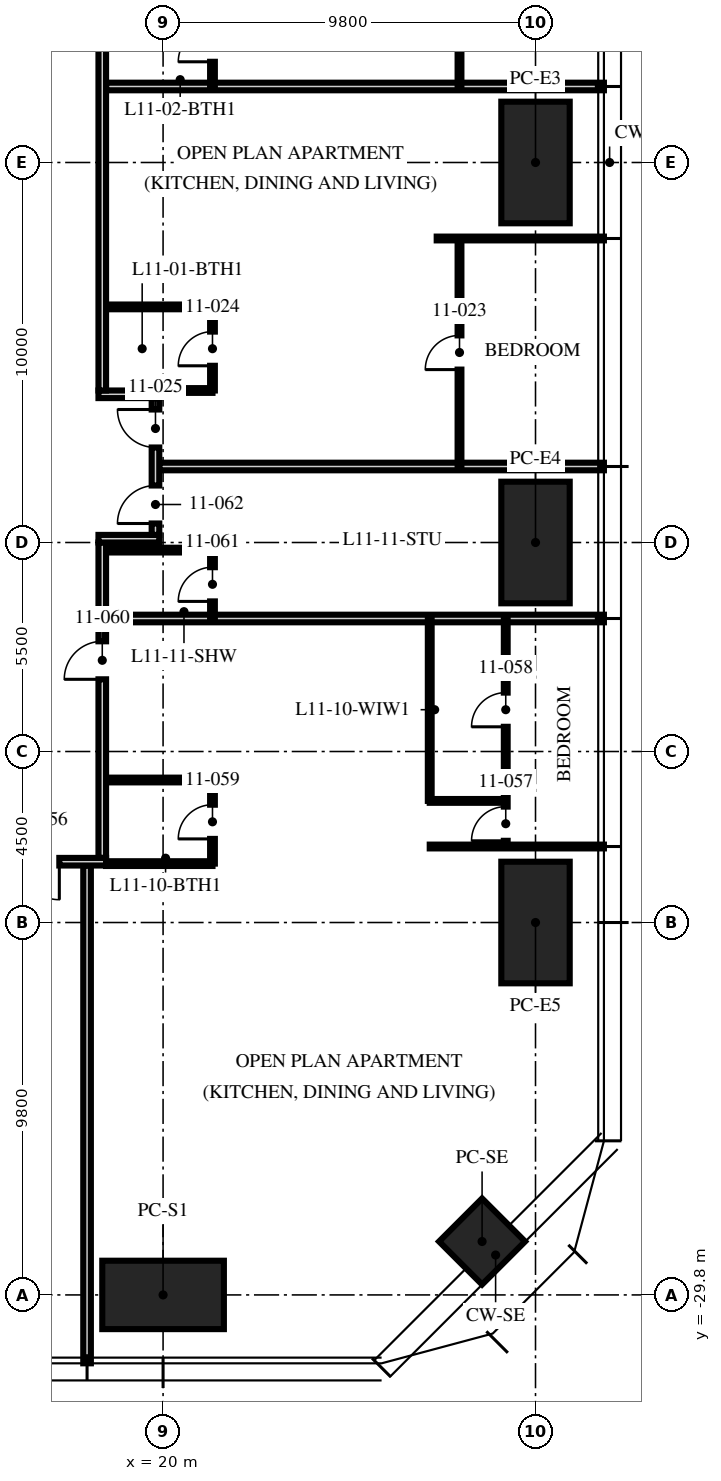
"""IFC4 building model, lengths in metres.
Left out: names, types, materials, properties, quantities, classifications, styles, units other than length and angle.
Written with IfcOpenShell. Run it as: python <this file> out.ifc"""

import sys

from ifc_helpers import new_model, si_unit, direction, frame, frame_2d, origin, origin_2d, place, context, subcontext, project, spatial, rectangle, hollow_rectangle, extrude, element, fill, save


model = new_model("IFC4")
c1 = context("Model", 3, precision=1e-05, world=origin(), true_north=direction((0.0, 1.0)))
c2 = subcontext(c1, "Body", "Model", "MODEL_VIEW")
j1 = project(units=[si_unit("LENGTHUNIT", "METRE"), si_unit("PLANEANGLEUNIT", "RADIAN")], contexts=[c1])
p1 = place(None, origin())
s1 = spatial("IfcSite", under=j1, at=p1, CompositionType="ELEMENT")
p2 = place(p1, origin())
s2 = spatial("IfcBuilding", under=s1, at=p2, CompositionType="ELEMENT")
p3 = place(p2, frame((0.0, 0.0, 47.25)))
s3 = spatial("IfcBuildingStorey", under=s2, at=p3, CompositionType="ELEMENT", Elevation=47.25)
for number, where, z_axis, x_axis in (
    (1, (29.8, 0.0, 0.0), (0.0, 0.0, 1.0), (0.0, 1.0, 0.0)),
    (2, (29.8, -10.0, 0.0), (0.0, 0.0, 1.0), (0.0, 1.0, 0.0)),
    (3, (29.8, -20.0, 0.0), (0.0, 0.0, 1.0), (0.0, 1.0, 0.0)),
    (4, (20.0, -29.8, 0.0), (0.0, 0.0, 1.0), (1.0, 0.0, 0.0)),
):
    element("IfcColumn", number, at=place(p3, frame(where, z_axis=z_axis, x_axis=x_axis)), inside=s3, PredefinedType="COLUMN", context=c2, shape_type="SweptSolid", body=[
        extrude(hollow_rectangle(XDim=3.2, YDim=1.8, WallThickness=0.2, at=origin_2d()), origin(), (0.0, 0.0, 1.0), 3.75),
    ])
p4 = place(p3, frame((28.394, -28.394, 0.0), z_axis=(0.0, 0.0, 1.0), x_axis=(0.707106781187, 0.707106781187, 0.0)))
e5 = element("IfcColumn", 5, at=p4, inside=s3, PredefinedType="COLUMN", context=c2, shape_type="SweptSolid", body=[
    extrude(hollow_rectangle(XDim=1.6, YDim=1.6, WallThickness=0.1, at=origin_2d()), origin(), (0.0, 0.0, 1.0), 3.75),
])
p5 = place(p3, frame((19.9, -8.0, 0.0), z_axis=(0.0, 0.0, 1.0), x_axis=(1.0, 0.0, 0.0)))
e6 = element("IfcWall", 6, at=p5, inside=s3, PredefinedType="PARTITIONING", context=c2, shape_type="SweptSolid", body=[
    extrude(rectangle(XDim=11.7, YDim=0.2, at=frame_2d((5.85, 0.0))), origin(), (0.0, 0.0, 1.0), 2.71),
])
p6 = place(p3, frame((27.2, -2.0, 0.0), z_axis=(0.0, 0.0, 1.0), x_axis=(1.0, 0.0, 0.0)))
e7 = element("IfcWall", 7, at=p6, inside=s3, PredefinedType="PARTITIONING", context=c2, shape_type="SweptSolid", body=[
    extrude(rectangle(XDim=4.4, YDim=0.1, at=frame_2d((2.2, 0.0))), origin(), (0.0, 0.0, 1.0), 2.71),
])
p7 = place(p3, frame((18.5, 2.0, 0.0), z_axis=(0.0, 0.0, 1.0), x_axis=(1.0, 0.0, 0.0)))
e8 = element("IfcWall", 8, at=p7, inside=s3, PredefinedType="PARTITIONING", context=c2, shape_type="SweptSolid", body=[
    extrude(rectangle(XDim=13.1, YDim=0.2, at=frame_2d((6.55, 0.0))), origin(), (0.0, 0.0, 1.0), 2.71),
])
p8 = place(p3, frame((18.0, -18.5, 0.0), z_axis=(0.0, 0.0, 1.0), x_axis=(0.0, -1.0, 0.0)))
e9 = element("IfcWall", 9, at=p8, inside=s3, PredefinedType="PARTITIONING", context=c2, shape_type="SweptSolid", body=[
    extrude(rectangle(XDim=13.1, YDim=0.2, at=frame_2d((6.55, 0.0))), origin(), (0.0, 0.0, 1.0), 2.3),
])
p9 = place(p3, frame((27.017, -18.0, 0.0), z_axis=(0.0, 0.0, 1.0), x_axis=(1.0, 0.0, 0.0)))
e10 = element("IfcWall", 10, at=p9, inside=s3, PredefinedType="PARTITIONING", context=c2, shape_type="SweptSolid", body=[
    extrude(rectangle(XDim=4.583, YDim=0.1, at=frame_2d((2.292, 0.0))), origin(), (0.0, 0.0, 1.0), 2.71),
])
p10 = place(p3, frame((18.5, -12.0, 0.0), z_axis=(0.0, 0.0, 1.0), x_axis=(1.0, 0.0, 0.0)))
e11 = element("IfcWall", 11, at=p10, inside=s3, PredefinedType="PARTITIONING", context=c2, shape_type="SweptSolid", body=[
    extrude(rectangle(XDim=13.1, YDim=0.2, at=frame_2d((6.55, 0.0))), origin(), (0.0, 0.0, 1.0), 2.71),
])
p11 = place(p3, frame((27.8, -8.0, 0.0), z_axis=(0.0, 0.0, 1.0), x_axis=(0.0, 1.0, 0.0)))
e12 = element("IfcWall", 12, at=p11, inside=s3, PredefinedType="PARTITIONING", context=c2, shape_type="SweptSolid", body=[
    extrude(rectangle(XDim=6.0, YDim=0.1, at=frame_2d((3.0, 0.0))), origin(), (0.0, 0.0, 1.0), 2.61),
])
p12 = place(p11, frame((2.55, 0.0, 0.0)))
e13 = element("IfcOpeningElement", 13, at=p12, cuts=e12, PredefinedType="OPENING", context=c2, shape_type="SweptSolid", body=[
    extrude(rectangle(XDim=0.9, YDim=2.1, at=frame_2d((0.45, 1.05))), frame((0.0, 0.06, 0.0), z_axis=(0.0, -1.0, 0.0), x_axis=(1.0, 0.0, 0.0)), (0.0, 0.0, 1.0), 0.12),
])
p13 = place(p3, frame((21.3, -6.0, 0.0), z_axis=(0.0, 0.0, 1.0), x_axis=(0.0, 1.0, 0.0)))
e14 = element("IfcWall", 14, at=p13, inside=s3, PredefinedType="PARTITIONING", context=c2, shape_type="SweptSolid", body=[
    extrude(rectangle(XDim=2.2, YDim=0.125, at=frame_2d((1.1, 0.0))), origin(), (0.0, 0.0, 1.0), 2.61),
])
p14 = place(p13, frame((0.65, 0.0, 0.0)))
e15 = element("IfcOpeningElement", 15, at=p14, cuts=e14, PredefinedType="OPENING", context=c2, shape_type="SweptSolid", body=[
    extrude(rectangle(XDim=0.9, YDim=2.1, at=frame_2d((0.45, 1.05))), frame((0.0, 0.073, 0.0), z_axis=(0.0, -1.0, 0.0), x_axis=(1.0, 0.0, 0.0)), (0.0, 0.0, 1.0), 0.145),
])
p15 = place(p3, frame((19.97, -6.0, 0.0), z_axis=(0.0, 0.0, 1.0), x_axis=(1.0, 0.0, 0.0)))
e16 = element("IfcWall", 16, at=p15, inside=s3, PredefinedType="PARTITIONING", context=c2, shape_type="SweptSolid", body=[
    extrude(rectangle(XDim=1.33, YDim=0.125, at=frame_2d((0.665, 0.0))), origin(), (0.0, 0.0, 1.0), 3.5),
])
p16 = place(p3, frame((18.5, -3.8, 0.0), z_axis=(0.0, 0.0, 1.0), x_axis=(1.0, 0.0, 0.0)))
e17 = element("IfcWall", 17, at=p16, inside=s3, PredefinedType="PARTITIONING", context=c2, shape_type="SweptSolid", body=[
    extrude(rectangle(XDim=2.8, YDim=0.125, at=frame_2d((1.4, 0.0))), origin(), (0.0, 0.0, 1.0), 3.5),
])
p17 = place(p3, frame((27.8, 2.0, 0.0), z_axis=(0.0, 0.0, 1.0), x_axis=(0.0, 1.0, 0.0)))
e18 = element("IfcWall", 18, at=p17, inside=s3, PredefinedType="PARTITIONING", context=c2, shape_type="SweptSolid", body=[
    extrude(rectangle(XDim=6.0, YDim=0.1, at=frame_2d((3.0, 0.0))), origin(), (0.0, 0.0, 1.0), 2.61),
])
p18 = place(p17, frame((2.55, 0.0, 0.0)))
e19 = element("IfcOpeningElement", 19, at=p18, cuts=e18, PredefinedType="OPENING", context=c2, shape_type="SweptSolid", body=[
    extrude(rectangle(XDim=0.9, YDim=2.1, at=frame_2d((0.45, 1.05))), frame((0.0, 0.06, 0.0), z_axis=(0.0, -1.0, 0.0), x_axis=(1.0, 0.0, 0.0)), (0.0, 0.0, 1.0), 0.12),
])
p19 = place(p3, frame((21.3, 2.0, 0.0), z_axis=(0.0, 0.0, 1.0), x_axis=(0.0, 1.0, 0.0)))
e20 = element("IfcWall", 20, at=p19, inside=s3, PredefinedType="PARTITIONING", context=c2, shape_type="SweptSolid", body=[
    extrude(rectangle(XDim=4.4, YDim=0.125, at=frame_2d((2.2, 0.0))), origin(), (0.0, 0.0, 1.0), 2.61),
])
p20 = place(p19, frame((0.65, 0.0, 0.0)))
e21 = element("IfcOpeningElement", 21, at=p20, cuts=e20, PredefinedType="OPENING", context=c2, shape_type="SweptSolid", body=[
    extrude(rectangle(XDim=0.9, YDim=2.1, at=frame_2d((0.45, 1.05))), frame((0.0, 0.073, 0.0), z_axis=(0.0, -1.0, 0.0), x_axis=(1.0, 0.0, 0.0)), (0.0, 0.0, 1.0), 0.145),
])
p21 = place(p19, frame((2.85, 0.0, 0.0)))
e22 = element("IfcOpeningElement", 22, at=p21, cuts=e20, PredefinedType="OPENING", context=c2, shape_type="SweptSolid", body=[
    extrude(rectangle(XDim=0.9, YDim=2.1, at=frame_2d((0.45, 1.05))), frame((0.0, 0.073, 0.0), z_axis=(0.0, -1.0, 0.0), x_axis=(1.0, 0.0, 0.0)), (0.0, 0.0, 1.0), 0.145),
])
p22 = place(p3, frame((29.017, -18.0, 0.0), z_axis=(0.0, 0.0, 1.0), x_axis=(0.0, 1.0, 0.0)))
e23 = element("IfcWall", 23, at=p22, inside=s3, PredefinedType="PARTITIONING", context=c2, shape_type="SweptSolid", body=[
    extrude(rectangle(XDim=6.0, YDim=0.1, at=frame_2d((3.0, 0.0))), origin(), (0.0, 0.0, 1.0), 2.61),
])
p23 = place(p22, frame((0.15, 0.0, 0.0)))
e24 = element("IfcOpeningElement", 24, at=p23, cuts=e23, PredefinedType="OPENING", context=c2, shape_type="SweptSolid", body=[
    extrude(rectangle(XDim=0.9, YDim=2.1, at=frame_2d((0.45, 1.05))), frame((0.0, 0.06, 0.0), z_axis=(0.0, -1.0, 0.0), x_axis=(1.0, 0.0, 0.0)), (0.0, 0.0, 1.0), 0.12),
])
p24 = place(p22, frame((3.15, 0.0, 0.0)))
e25 = element("IfcOpeningElement", 25, at=p24, cuts=e23, PredefinedType="OPENING", context=c2, shape_type="SweptSolid", body=[
    extrude(rectangle(XDim=0.9, YDim=2.1, at=frame_2d((0.45, 1.05))), frame((0.0, 0.06, 0.0), z_axis=(0.0, -1.0, 0.0), x_axis=(1.0, 0.0, 0.0)), (0.0, 0.0, 1.0), 0.12),
])
p25 = place(p3, frame((27.017, -16.8, 0.0), z_axis=(0.0, 0.0, 1.0), x_axis=(1.0, 0.0, 0.0)))
e26 = element("IfcWall", 26, at=p25, inside=s3, PredefinedType="PARTITIONING", context=c2, shape_type="SweptSolid", body=[
    extrude(rectangle(XDim=2.0, YDim=0.1, at=frame_2d((1.0, 0.0))), origin(), (0.0, 0.0, 1.0), 3.5),
])
p26 = place(p3, frame((27.017, -16.8, 0.0), z_axis=(0.0, 0.0, 1.0), x_axis=(0.0, 1.0, 0.0)))
e27 = element("IfcWall", 27, at=p26, inside=s3, PredefinedType="PARTITIONING", context=c2, shape_type="SweptSolid", body=[
    extrude(rectangle(XDim=4.8, YDim=0.1, at=frame_2d((2.4, 0.0))), origin(), (0.0, 0.0, 1.0), 2.61),
])
p27 = place(p3, frame((21.3, -18.45, 0.0), z_axis=(0.0, 0.0, 1.0), x_axis=(0.0, 1.0, 0.0)))
e28 = element("IfcWall", 28, at=p27, inside=s3, PredefinedType="PARTITIONING", context=c2, shape_type="SweptSolid", body=[
    extrude(rectangle(XDim=2.2, YDim=0.125, at=frame_2d((1.1, 0.0))), origin(), (0.0, 0.0, 1.0), 3.5),
])
p28 = place(p27, frame((0.65, 0.0, 0.0)))
e29 = element("IfcOpeningElement", 29, at=p28, cuts=e28, PredefinedType="OPENING", context=c2, shape_type="SweptSolid", body=[
    extrude(rectangle(XDim=0.9, YDim=2.1, at=frame_2d((0.45, 1.05))), frame((0.0, 0.073, 0.0), z_axis=(0.0, -1.0, 0.0), x_axis=(1.0, 0.0, 0.0)), (0.0, 0.0, 1.0), 0.145),
])
p29 = place(p3, frame((18.5, -18.45, 0.0), z_axis=(0.0, 0.0, 1.0), x_axis=(1.0, 0.0, 0.0)))
e30 = element("IfcWall", 30, at=p29, inside=s3, PredefinedType="PARTITIONING", context=c2, shape_type="SweptSolid", body=[
    extrude(rectangle(XDim=2.8, YDim=0.125, at=frame_2d((1.4, 0.0))), origin(), (0.0, 0.0, 1.0), 2.3),
])
p30 = place(p3, frame((18.5, -16.25, 0.0), z_axis=(0.0, 0.0, 1.0), x_axis=(1.0, 0.0, 0.0)))
e31 = element("IfcWall", 31, at=p30, inside=s3, PredefinedType="PARTITIONING", context=c2, shape_type="SweptSolid", body=[
    extrude(rectangle(XDim=2.8, YDim=0.125, at=frame_2d((1.4, 0.0))), origin(), (0.0, 0.0, 1.0), 3.5),
])
p31 = place(p3, frame((21.3, -12.0, 0.0), z_axis=(0.0, 0.0, 1.0), x_axis=(0.0, 1.0, 0.0)))
e32 = element("IfcWall", 32, at=p31, inside=s3, PredefinedType="PARTITIONING", context=c2, shape_type="SweptSolid", body=[
    extrude(rectangle(XDim=1.8, YDim=0.125, at=frame_2d((0.9, 0.0))), origin(), (0.0, 0.0, 1.0), 3.5),
])
p32 = place(p31, frame((0.45, 0.0, 0.0)))
e33 = element("IfcOpeningElement", 33, at=p32, cuts=e32, PredefinedType="OPENING", context=c2, shape_type="SweptSolid", body=[
    extrude(rectangle(XDim=0.9, YDim=2.1, at=frame_2d((0.45, 1.05))), frame((0.0, 0.073, 0.0), z_axis=(0.0, -1.0, 0.0), x_axis=(1.0, 0.0, 0.0)), (0.0, 0.0, 1.0), 0.145),
])
p33 = place(p3, frame((18.5, -10.2, 0.0), z_axis=(0.0, 0.0, 1.0), x_axis=(1.0, 0.0, 0.0)))
e34 = element("IfcWall", 34, at=p33, inside=s3, PredefinedType="PARTITIONING", context=c2, shape_type="SweptSolid", body=[
    extrude(rectangle(XDim=2.8, YDim=0.125, at=frame_2d((1.4, 0.0))), origin(), (0.0, 0.0, 1.0), 2.492),
])
p34 = place(p3, frame((18.4, -18.3, 0.0), z_axis=(0.0, 0.0, 1.0), x_axis=(0.0, 1.0, 0.0)))
e35 = element("IfcWall", 35, at=p34, inside=s3, PredefinedType="PARTITIONING", context=c2, shape_type="SweptSolid", body=[
    extrude(rectangle(XDim=8.3, YDim=0.2, at=frame_2d((4.15, 0.0))), origin(), (0.0, 0.0, 1.0), 2.3),
])
p35 = place(p34, frame((4.7, 0.0, 0.0)))
e36 = element("IfcOpeningElement", 36, at=p35, cuts=e35, PredefinedType="OPENING", context=c2, shape_type="SweptSolid", body=[
    extrude(rectangle(XDim=1.0, YDim=2.2, at=frame_2d((0.5, 1.1))), frame((0.0, 0.11, 0.0), z_axis=(0.0, -1.0, 0.0), x_axis=(1.0, 0.0, 0.0)), (0.0, 0.0, 1.0), 0.22),
])
p36 = place(p3, frame((18.3, -9.9, 0.0), z_axis=(0.0, 0.0, 1.0), x_axis=(1.0, 0.0, 0.0)))
e37 = element("IfcWall", 37, at=p36, inside=s3, PredefinedType="PARTITIONING", context=c2, shape_type="SweptSolid", body=[
    extrude(rectangle(XDim=1.6, YDim=0.2, at=frame_2d((0.8, 0.0))), origin(), (0.0, 0.0, 1.0), 2.492),
])
p37 = place(p3, frame((18.3, -6.1, 0.0), z_axis=(0.0, 0.0, 1.0), x_axis=(1.0, 0.0, 0.0)))
e38 = element("IfcWall", 38, at=p37, inside=s3, PredefinedType="PARTITIONING", context=c2, shape_type="SweptSolid", body=[
    extrude(rectangle(XDim=1.6, YDim=0.2, at=frame_2d((0.8, 0.0))), origin(), (0.0, 0.0, 1.0), 3.5),
])
p38 = place(p3, frame((19.8, -9.8, 0.0), z_axis=(0.0, 0.0, 1.0), x_axis=(0.0, 1.0, 0.0)))
e39 = element("IfcWall", 39, at=p38, inside=s3, PredefinedType="PARTITIONING", context=c2, shape_type="SweptSolid", body=[
    extrude(rectangle(XDim=3.6, YDim=0.2, at=frame_2d((1.8, 0.0))), origin(), (0.0, 0.0, 1.0), 3.5),
])
p39 = place(p38, frame((2.3, 0.0, 0.0)))
e40 = element("IfcOpeningElement", 40, at=p39, cuts=e39, PredefinedType="OPENING", context=c2, shape_type="SweptSolid", body=[
    extrude(rectangle(XDim=1.0, YDim=2.2, at=frame_2d((0.5, 1.1))), frame((0.0, 0.11, 0.0), z_axis=(0.0, -1.0, 0.0), x_axis=(1.0, 0.0, 0.0)), (0.0, 0.0, 1.0), 0.22),
])
p40 = place(p38, frame((0.3, 0.0, 0.0)))
e41 = element("IfcOpeningElement", 41, at=p40, cuts=e39, PredefinedType="OPENING", context=c2, shape_type="SweptSolid", body=[
    extrude(rectangle(XDim=1.0, YDim=2.2, at=frame_2d((0.5, 1.1))), frame((0.0, 0.11, 0.0), z_axis=(0.0, -1.0, 0.0), x_axis=(1.0, 0.0, 0.0)), (0.0, 0.0, 1.0), 0.22),
])
p41 = place(p3, frame((18.4, -6.0, 0.0), z_axis=(0.0, 0.0, 1.0), x_axis=(0.0, 1.0, 0.0)))
e42 = element("IfcWall", 42, at=p41, inside=s3, PredefinedType="PARTITIONING", context=c2, shape_type="SweptSolid", body=[
    extrude(rectangle(XDim=24.3, YDim=0.2, at=frame_2d((12.15, 0.0))), origin(), (0.0, 0.0, 1.0), 2.3),
])
p42 = place(p3, frame((18.5, -18.4, 0.0), z_axis=(0.0, 0.0, 1.0), x_axis=(-1.0, 0.0, 0.0)))
e43 = element("IfcWall", 43, at=p42, inside=s3, PredefinedType="PARTITIONING", context=c2, shape_type="SweptSolid", body=[
    extrude(rectangle(XDim=37.0, YDim=0.2, at=frame_2d((18.5, 0.0))), origin(), (0.0, 0.0, 1.0), 2.3),
])
p43 = place(p42, frame((1.23, 0.0, 0.0)))
e44 = element("IfcOpeningElement", 44, at=p43, cuts=e43, PredefinedType="OPENING", context=c2, shape_type="SweptSolid", body=[
    extrude(rectangle(XDim=1.0, YDim=2.2, at=frame_2d((0.5, 1.1))), frame((0.0, 0.11, 0.0), z_axis=(0.0, -1.0, 0.0), x_axis=(1.0, 0.0, 0.0)), (0.0, 0.0, 1.0), 0.22),
])
p44 = place(p12, origin())
e45 = element("IfcDoor", 45, at=p44, inside=s3, OperationType="SINGLE_SWING_LEFT", PredefinedType="DOOR", context=c2, shape_type="SweptSolid", body=[
    extrude(rectangle(XDim=0.9, YDim=2.1, at=frame_2d((0.45, 1.05))), frame((0.0, 0.025, 0.0), z_axis=(0.0, -1.0, 0.0), x_axis=(1.0, 0.0, 0.0)), (0.0, 0.0, 1.0), 0.05),
])
fill(e13, e45)
p45 = place(p14, origin())
e46 = element("IfcDoor", 46, at=p45, inside=s3, OperationType="SINGLE_SWING_LEFT", PredefinedType="DOOR", context=c2, shape_type="SweptSolid", body=[
    extrude(rectangle(XDim=0.9, YDim=2.1, at=frame_2d((0.45, 1.05))), frame((0.0, 0.025, 0.0), z_axis=(0.0, -1.0, 0.0), x_axis=(1.0, 0.0, 0.0)), (0.0, 0.0, 1.0), 0.05),
])
fill(e15, e46)
p46 = place(p39, origin())
e47 = element("IfcDoor", 47, at=p46, inside=s3, OperationType="SINGLE_SWING_RIGHT", PredefinedType="DOOR", context=c2, shape_type="SweptSolid", body=[
    extrude(rectangle(XDim=1.0, YDim=2.2, at=frame_2d((0.5, 1.1))), frame((0.0, 0.025, 0.0), z_axis=(0.0, -1.0, 0.0), x_axis=(1.0, 0.0, 0.0)), (0.0, 0.0, 1.0), 0.05),
])
fill(e40, e47)
p47 = place(p20, origin())
e48 = element("IfcDoor", 48, at=p47, inside=s3, OperationType="SINGLE_SWING_LEFT", PredefinedType="DOOR", context=c2, shape_type="SweptSolid", body=[
    extrude(rectangle(XDim=0.9, YDim=2.1, at=frame_2d((0.45, 1.05))), frame((0.0, 0.025, 0.0), z_axis=(0.0, -1.0, 0.0), x_axis=(1.0, 0.0, 0.0)), (0.0, 0.0, 1.0), 0.05),
])
fill(e21, e48)
p48 = place(p43, origin())
e49 = element("IfcDoor", 49, at=p48, inside=s3, OperationType="SINGLE_SWING_LEFT", PredefinedType="DOOR", context=c2, shape_type="SweptSolid", body=[
    extrude(rectangle(XDim=1.0, YDim=2.2, at=frame_2d((0.5, 1.1))), frame((0.0, 0.025, 0.0), z_axis=(0.0, -1.0, 0.0), x_axis=(1.0, 0.0, 0.0)), (0.0, 0.0, 1.0), 0.05),
])
fill(e44, e49)
p49 = place(p23, origin())
e50 = element("IfcDoor", 50, at=p49, inside=s3, OperationType="SINGLE_SWING_LEFT", PredefinedType="DOOR", context=c2, shape_type="SweptSolid", body=[
    extrude(rectangle(XDim=0.9, YDim=2.1, at=frame_2d((0.45, 1.05))), frame((0.0, 0.025, 0.0), z_axis=(0.0, -1.0, 0.0), x_axis=(1.0, 0.0, 0.0)), (0.0, 0.0, 1.0), 0.05),
])
fill(e24, e50)
p50 = place(p24, origin())
e51 = element("IfcDoor", 51, at=p50, inside=s3, OperationType="SINGLE_SWING_LEFT", PredefinedType="DOOR", context=c2, shape_type="SweptSolid", body=[
    extrude(rectangle(XDim=0.9, YDim=2.1, at=frame_2d((0.45, 1.05))), frame((0.0, 0.025, 0.0), z_axis=(0.0, -1.0, 0.0), x_axis=(1.0, 0.0, 0.0)), (0.0, 0.0, 1.0), 0.05),
])
fill(e25, e51)
p51 = place(p28, origin())
e52 = element("IfcDoor", 52, at=p51, inside=s3, OperationType="SINGLE_SWING_LEFT", PredefinedType="DOOR", context=c2, shape_type="SweptSolid", body=[
    extrude(rectangle(XDim=0.9, YDim=2.1, at=frame_2d((0.45, 1.05))), frame((0.0, 0.025, 0.0), z_axis=(0.0, -1.0, 0.0), x_axis=(1.0, 0.0, 0.0)), (0.0, 0.0, 1.0), 0.05),
])
fill(e29, e52)
p52 = place(p35, origin())
e53 = element("IfcDoor", 53, at=p52, inside=s3, OperationType="SINGLE_SWING_LEFT", PredefinedType="DOOR", context=c2, shape_type="SweptSolid", body=[
    extrude(rectangle(XDim=1.0, YDim=2.2, at=frame_2d((0.5, 1.1))), frame((0.0, 0.025, 0.0), z_axis=(0.0, -1.0, 0.0), x_axis=(1.0, 0.0, 0.0)), (0.0, 0.0, 1.0), 0.05),
])
fill(e36, e53)
p53 = place(p32, origin())
e54 = element("IfcDoor", 54, at=p53, inside=s3, OperationType="SINGLE_SWING_LEFT", PredefinedType="DOOR", context=c2, shape_type="SweptSolid", body=[
    extrude(rectangle(XDim=0.9, YDim=2.1, at=frame_2d((0.45, 1.05))), frame((0.0, 0.025, 0.0), z_axis=(0.0, -1.0, 0.0), x_axis=(1.0, 0.0, 0.0)), (0.0, 0.0, 1.0), 0.05),
])
fill(e33, e54)
p54 = place(p40, origin())
e55 = element("IfcDoor", 55, at=p54, inside=s3, OperationType="SINGLE_SWING_LEFT", PredefinedType="DOOR", context=c2, shape_type="SweptSolid", body=[
    extrude(rectangle(XDim=1.0, YDim=2.2, at=frame_2d((0.5, 1.1))), frame((0.0, 0.025, 0.0), z_axis=(0.0, -1.0, 0.0), x_axis=(1.0, 0.0, 0.0)), (0.0, 0.0, 1.0), 0.05),
])
fill(e41, e55)
save(model, sys.argv[1])
